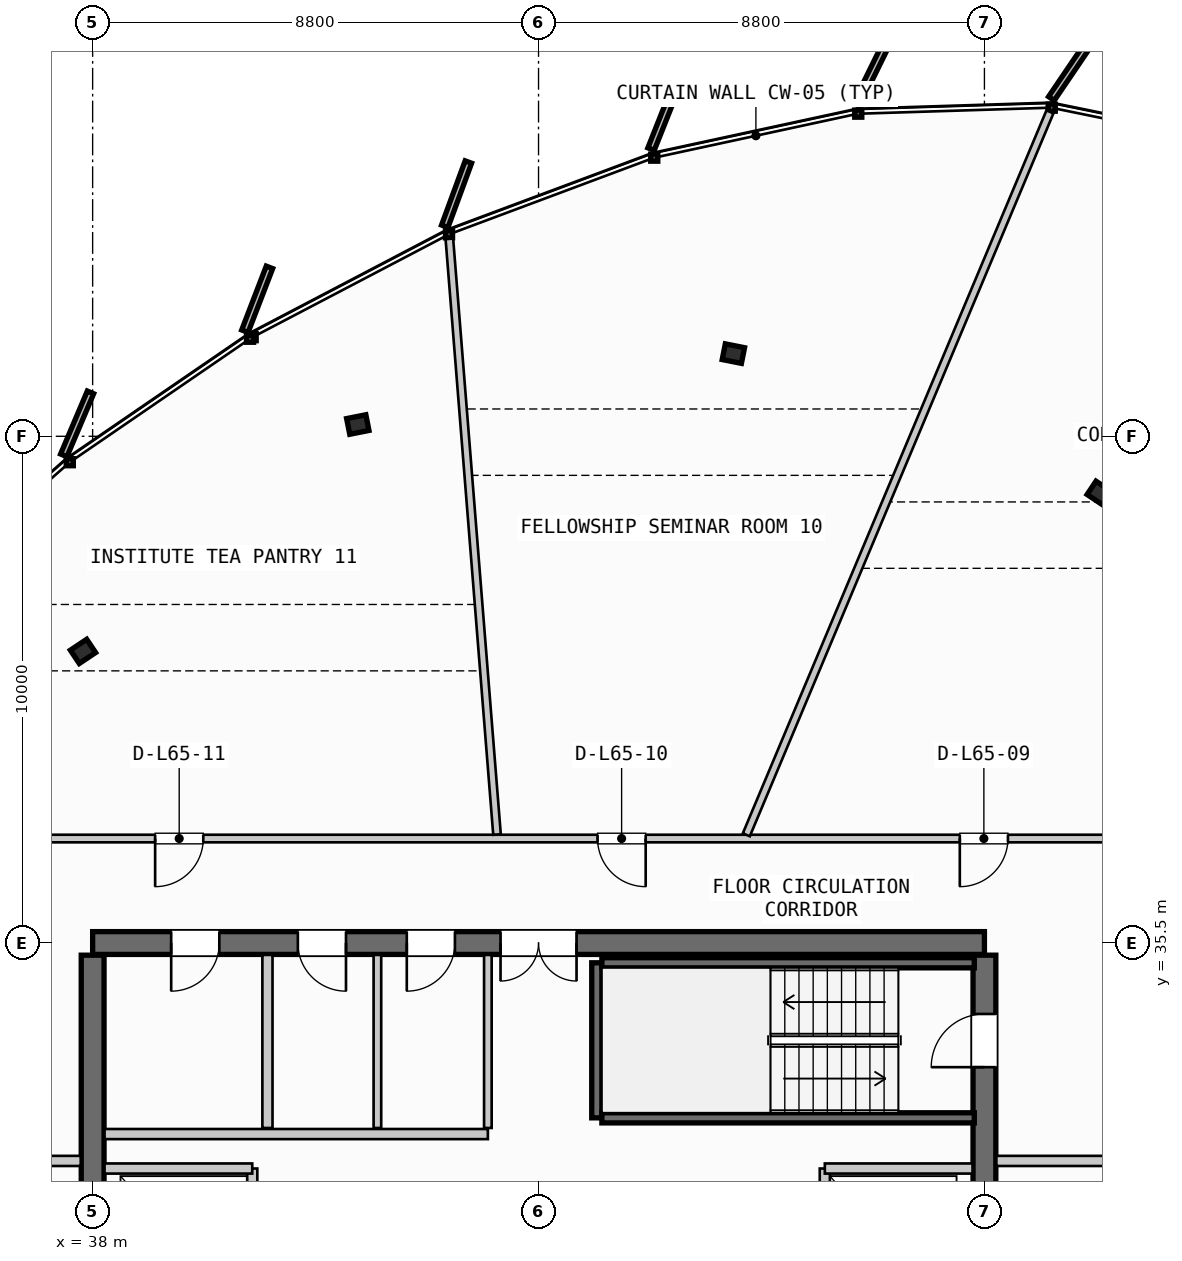
"""IFC4 building model, lengths in metres.
Left out: names, types, materials, properties, quantities, classifications, styles, units other than length and angle.
Written with IfcOpenShell. Run it as: python <this file> out.ifc"""

import sys

from ifc_helpers import new_model, si_unit, direction, frame, frame_2d, origin, origin_2d, place, context, subcontext, project, spatial, rectangle, i_section, extrude, source, transform, mapped, element, fill, save


model = new_model("IFC4")
c1 = context("Model", 3, precision=1e-05, world=origin(), true_north=direction((0.0, 1.0)))
c2 = subcontext(c1, "Body", "Model", "MODEL_VIEW")
j1 = project(units=[si_unit("LENGTHUNIT", "METRE"), si_unit("PLANEANGLEUNIT", "RADIAN")], contexts=[c1])
p1 = place(None, origin())
s1 = spatial("IfcSite", under=j1, at=p1, CompositionType="ELEMENT")
p2 = place(p1, origin())
s2 = spatial("IfcBuilding", under=s1, at=p2, CompositionType="ELEMENT")
p3 = place(p2, frame((0.0, 0.0, 249.1)))
s3 = spatial("IfcBuildingStorey", under=s2, at=p3, CompositionType="ELEMENT", Elevation=249.1)
p4 = place(p3, frame((55.6, 35.5, 0.0), z_axis=(0.0, 0.0, 1.0), x_axis=(-1.0, 0.0, 0.0)))
e1 = element("IfcWall", 1, at=p4, inside=s3, PredefinedType="SHEAR", context=c2, shape_type="SweptSolid", body=[
    extrude(rectangle(XDim=17.6, YDim=0.45, at=frame_2d((8.8, 0.0))), origin(), (0.0, 0.0, 1.0), 3.21),
])
p5 = place(p4, frame((8.05, 0.0, 0.0)))
e2 = element("IfcOpeningElement", 2, at=p5, cuts=e1, PredefinedType="OPENING", context=c2, shape_type="SweptSolid", body=[
    extrude(rectangle(XDim=1.5, YDim=2.2, at=frame_2d((0.75, 1.1))), frame((0.0, 0.235, 0.0), z_axis=(0.0, -1.0, 0.0), x_axis=(1.0, 0.0, 0.0)), (0.0, 0.0, 1.0), 0.47),
])
p6 = place(p4, frame((15.1, 0.0, 0.0)))
e3 = element("IfcOpeningElement", 3, at=p6, cuts=e1, PredefinedType="OPENING", context=c2, shape_type="SweptSolid", body=[
    extrude(rectangle(XDim=0.95, YDim=2.15, at=frame_2d((0.475, 1.075))), frame((0.0, 0.235, 0.0), z_axis=(0.0, -1.0, 0.0), x_axis=(1.0, 0.0, 0.0)), (0.0, 0.0, 1.0), 0.47),
])
p7 = place(p4, frame((12.6, 0.0, 0.0)))
e4 = element("IfcOpeningElement", 4, at=p7, cuts=e1, PredefinedType="OPENING", context=c2, shape_type="SweptSolid", body=[
    extrude(rectangle(XDim=0.95, YDim=2.15, at=frame_2d((0.475, 1.075))), frame((0.0, 0.235, 0.0), z_axis=(0.0, -1.0, 0.0), x_axis=(1.0, 0.0, 0.0)), (0.0, 0.0, 1.0), 0.47),
])
p8 = place(p4, frame((10.45, 0.0, 0.0)))
e5 = element("IfcOpeningElement", 5, at=p8, cuts=e1, PredefinedType="OPENING", context=c2, shape_type="SweptSolid", body=[
    extrude(rectangle(XDim=0.95, YDim=2.15, at=frame_2d((0.475, 1.075))), frame((0.0, 0.235, 0.0), z_axis=(0.0, -1.0, 0.0), x_axis=(1.0, 0.0, 0.0)), (0.0, 0.0, 1.0), 0.47),
])
p9 = place(p3, frame((38.0, 35.26, 0.0), z_axis=(0.0, 0.0, 1.0), x_axis=(0.0, -1.0, 0.0)))
e6 = element("IfcWall", 6, at=p9, inside=s3, PredefinedType="SHEAR", context=c2, shape_type="SweptSolid", body=[
    extrude(rectangle(XDim=14.92, YDim=0.45, at=frame_2d((7.46, 0.0))), origin(), (0.0, 0.0, 1.0), 3.21),
])
p10 = place(p9, frame((5.21, 0.0, 0.0)))
e7 = element("IfcOpeningElement", 7, at=p10, cuts=e6, PredefinedType="OPENING", context=c2, shape_type="SweptSolid", body=[
    extrude(rectangle(XDim=1.1, YDim=2.2, at=frame_2d((0.55, 1.1))), frame((0.0, 0.235, 0.0), z_axis=(0.0, -1.0, 0.0), x_axis=(1.0, 0.0, 0.0)), (0.0, 0.0, 1.0), 0.47),
])
p11 = place(p3, frame((55.6, 20.34, 0.0), z_axis=(0.0, 0.0, 1.0), x_axis=(0.0, 1.0, 0.0)))
e8 = element("IfcWall", 8, at=p11, inside=s3, PredefinedType="SHEAR", context=c2, shape_type="SweptSolid", body=[
    extrude(rectangle(XDim=14.92, YDim=0.45, at=frame_2d((7.46, 0.0))), origin(), (0.0, 0.0, 1.0), 3.21),
])
p12 = place(p11, frame((12.71, 0.0, 0.0)))
e9 = element("IfcOpeningElement", 9, at=p12, cuts=e8, PredefinedType="OPENING", context=c2, shape_type="SweptSolid", body=[
    extrude(rectangle(XDim=1.05, YDim=2.15, at=frame_2d((0.525, 1.075))), frame((0.0, 0.235, 0.0), z_axis=(0.0, -1.0, 0.0), x_axis=(1.0, 0.0, 0.0)), (0.0, 0.0, 1.0), 0.47),
])
p13 = place(p11, frame((8.61, 0.0, 0.0)))
e10 = element("IfcOpeningElement", 10, at=p13, cuts=e8, PredefinedType="OPENING", context=c2, shape_type="SweptSolid", body=[
    extrude(rectangle(XDim=1.1, YDim=2.2, at=frame_2d((0.55, 1.1))), frame((0.0, 0.235, 0.0), z_axis=(0.0, -1.0, 0.0), x_axis=(1.0, 0.0, 0.0)), (0.0, 0.0, 1.0), 0.47),
])
m1 = source(origin(), c2, "Body", "SweptSolid", [
    extrude(i_section(OverallWidth=0.387, OverallDepth=0.316, WebThickness=0.019, FlangeThickness=0.028, FilletRadius=0.015, at=origin_2d()), origin(), (0.0, 0.0, 1.0), 3.21),
])
for number, where, z_axis, x_axis in (
    (11, (57.875, 44.375, 0.0), (0.0, 0.0, 1.0), (0.556, 0.831, 0.0)),
    (12, (50.645, 47.132, 0.0), (0.0, 0.0, 1.0), (0.195, 0.981, 0.0)),
    (13, (43.233, 45.732, 0.0), (0.0, 0.0, 1.0), (-0.195, 0.981, 0.0)),
    (14, (37.81, 41.255, 0.0), (0.0, 0.0, 1.0), (-0.556, 0.831, 0.0)),
):
    element("IfcColumn", number, at=place(p3, frame(where, z_axis=z_axis, x_axis=x_axis)), inside=s3, PredefinedType="COLUMN", context=c2, shape_type="MappedRepresentation", body=[
        mapped(m1, transform((0.0, 0.0, 0.0), scale=1.0)),
    ])
p14 = place(p3, frame((47.95, 32.05, 0.0), z_axis=(0.0, 0.0, 1.0), x_axis=(0.0, 1.0, 0.0)))
e15 = element("IfcWall", 15, at=p14, inside=s3, PredefinedType="SHEAR", context=c2, shape_type="SweptSolid", body=[
    extrude(rectangle(XDim=3.06, YDim=0.2, at=frame_2d((1.53, 0.0))), origin(), (0.0, 0.0, 1.0), 3.21),
])
for number, where, z_axis, x_axis in (
    (16, (48.05, 35.11, 0.0), (0.0, 0.0, 1.0), (1.0, 0.0, 0.0)),
    (17, (55.4, 32.05, 0.0), (0.0, 0.0, 1.0), (-1.0, 0.0, 0.0)),
):
    element("IfcWall", number, at=place(p3, frame(where, z_axis=z_axis, x_axis=x_axis)), inside=s3, PredefinedType="SHEAR", context=c2, shape_type="SweptSolid", body=[
        extrude(rectangle(XDim=7.35, YDim=0.2, at=frame_2d((3.675, 0.0))), origin(), (0.0, 0.0, 1.0), 3.21),
    ])
p15 = place(p3, frame((41.15, 27.95, 0.0), z_axis=(0.0, 0.0, 1.0), x_axis=(0.0, 1.0, 0.0)))
e18 = element("IfcWall", 18, at=p15, inside=s3, PredefinedType="PARTITIONING", context=c2, shape_type="SweptSolid", body=[
    extrude(rectangle(XDim=3.1, YDim=0.2, at=frame_2d((1.55, 0.0))), origin(), (0.0, 0.0, 1.0), 2.28),
])
p16 = place(p3, frame((38.235, 31.05, 0.0), z_axis=(0.0, 0.0, 1.0), x_axis=(1.0, 0.0, 0.0)))
e19 = element("IfcWall", 19, at=p16, inside=s3, PredefinedType="PARTITIONING", context=c2, shape_type="SweptSolid", body=[
    extrude(rectangle(XDim=2.915, YDim=0.2, at=frame_2d((1.458, 0.0))), origin(), (0.0, 0.0, 1.0), 2.28),
])
p17 = place(p3, frame((34.5, 31.2, 0.0), z_axis=(0.0, 0.0, 1.0), x_axis=(1.0, 0.0, 0.0)))
e20 = element("IfcWall", 20, at=p17, inside=s3, PredefinedType="PARTITIONING", context=c2, shape_type="SweptSolid", body=[
    extrude(rectangle(XDim=3.265, YDim=0.2, at=frame_2d((1.632, 0.0))), origin(), (0.0, 0.0, 1.0), 2.28),
])
p18 = place(p3, frame((52.45, 27.95, 0.0), z_axis=(0.0, 0.0, 1.0), x_axis=(0.0, 1.0, 0.0)))
e21 = element("IfcWall", 21, at=p18, inside=s3, PredefinedType="PARTITIONING", context=c2, shape_type="SweptSolid", body=[
    extrude(rectangle(XDim=3.1, YDim=0.2, at=frame_2d((1.55, 0.0))), origin(), (0.0, 0.0, 1.0), 2.28),
])
p19 = place(p3, frame((52.45, 31.05, 0.0), z_axis=(0.0, 0.0, 1.0), x_axis=(1.0, 0.0, 0.0)))
e22 = element("IfcWall", 22, at=p19, inside=s3, PredefinedType="PARTITIONING", context=c2, shape_type="SweptSolid", body=[
    extrude(rectangle(XDim=2.915, YDim=0.2, at=frame_2d((1.458, 0.0))), origin(), (0.0, 0.0, 1.0), 2.28),
])
p20 = place(p3, frame((55.835, 31.2, 0.0), z_axis=(0.0, 0.0, 1.0), x_axis=(1.0, 0.0, 0.0)))
e23 = element("IfcWall", 23, at=p20, inside=s3, PredefinedType="PARTITIONING", context=c2, shape_type="SweptSolid", body=[
    extrude(rectangle(XDim=3.265, YDim=0.2, at=frame_2d((1.633, 0.0))), origin(), (0.0, 0.0, 1.0), 2.28),
])
p21 = place(p3, frame((41.45, 31.85, 0.0), z_axis=(0.0, 0.0, 1.0), x_axis=(0.0, 1.0, 0.0)))
e24 = element("IfcWall", 24, at=p21, inside=s3, PredefinedType="PARTITIONING", context=c2, shape_type="SweptSolid", body=[
    extrude(rectangle(XDim=3.415, YDim=0.2, at=frame_2d((1.708, 0.0))), origin(), (0.0, 0.0, 1.0), 2.28),
])
p22 = place(p3, frame((38.235, 31.73, 0.0), z_axis=(0.0, 0.0, 1.0), x_axis=(1.0, 0.0, 0.0)))
e25 = element("IfcWall", 25, at=p22, inside=s3, PredefinedType="PARTITIONING", context=c2, shape_type="SweptSolid", body=[
    extrude(rectangle(XDim=7.565, YDim=0.2, at=frame_2d((3.782, 0.0))), origin(), (0.0, 0.0, 1.0), 2.28),
])
p23 = place(p3, frame((45.8, 31.85, 0.0), z_axis=(0.0, 0.0, 1.0), x_axis=(0.0, 1.0, 0.0)))
e26 = element("IfcWall", 26, at=p23, inside=s3, PredefinedType="PARTITIONING", context=c2, shape_type="SweptSolid", body=[
    extrude(rectangle(XDim=3.415, YDim=0.15, at=frame_2d((1.708, 0.0))), origin(), (0.0, 0.0, 1.0), 2.28),
])
p24 = place(p3, frame((43.62, 31.85, 0.0), z_axis=(0.0, 0.0, 1.0), x_axis=(0.0, 1.0, 0.0)))
e27 = element("IfcWall", 27, at=p24, inside=s3, PredefinedType="PLUMBINGWALL", context=c2, shape_type="SweptSolid", body=[
    extrude(rectangle(XDim=3.415, YDim=0.15, at=frame_2d((1.708, 0.0))), origin(), (0.0, 0.0, 1.0), 2.28),
])
p25 = place(p3, frame((60.888, 37.562, 0.0), z_axis=(0.0, 0.0, 1.0), x_axis=(-1.0, 0.0, 0.0)))
e28 = element("IfcWall", 28, at=p25, inside=s3, PredefinedType="PARTITIONING", context=c2, shape_type="SweptSolid", body=[
    extrude(rectangle(XDim=28.038, YDim=0.15, at=frame_2d((14.019, 0.0))), origin(), (0.0, 0.0, 1.0), 2.28),
])
p26 = place(p25, frame((4.824, 0.0, 0.0)))
e29 = element("IfcOpeningElement", 29, at=p26, cuts=e28, PredefinedType="OPENING", context=c2, shape_type="SweptSolid", body=[
    extrude(rectangle(XDim=0.95, YDim=2.15, at=frame_2d((0.475, 1.075))), frame((0.0, 0.085, 0.0), z_axis=(0.0, -1.0, 0.0), x_axis=(1.0, 0.0, 0.0)), (0.0, 0.0, 1.0), 0.17),
])
p27 = place(p25, frame((11.973, 0.0, 0.0)))
e30 = element("IfcOpeningElement", 30, at=p27, cuts=e28, PredefinedType="OPENING", context=c2, shape_type="SweptSolid", body=[
    extrude(rectangle(XDim=0.95, YDim=2.15, at=frame_2d((0.475, 1.075))), frame((0.0, 0.085, 0.0), z_axis=(0.0, -1.0, 0.0), x_axis=(1.0, 0.0, 0.0)), (0.0, 0.0, 1.0), 0.17),
])
p28 = place(p25, frame((20.705, 0.0, 0.0)))
e31 = element("IfcOpeningElement", 31, at=p28, cuts=e28, PredefinedType="OPENING", context=c2, shape_type="SweptSolid", body=[
    extrude(rectangle(XDim=0.95, YDim=2.15, at=frame_2d((0.475, 1.075))), frame((0.0, 0.085, 0.0), z_axis=(0.0, -1.0, 0.0), x_axis=(1.0, 0.0, 0.0)), (0.0, 0.0, 1.0), 0.17),
])
p29 = place(p3, frame((50.901, 37.636, 0.0), z_axis=(0.0, 0.0, 1.0), x_axis=(0.387249919783, 0.921974782534, 0.0)))
e32 = element("IfcWall", 32, at=p29, inside=s3, PredefinedType="PARTITIONING", context=c2, shape_type="SweptSolid", body=[
    extrude(rectangle(XDim=15.474, YDim=0.15, at=frame_2d((7.737, 0.0))), origin(), (0.0, 0.0, 1.0), 2.28),
])
p30 = place(p3, frame((45.981, 37.642, 0.0), z_axis=(0.0, 0.0, 1.0), x_axis=(-0.079751805429, 0.996814751863, 0.0)))
e33 = element("IfcWall", 33, at=p30, inside=s3, PredefinedType="PARTITIONING", context=c2, shape_type="SweptSolid", body=[
    extrude(rectangle(XDim=11.792, YDim=0.15, at=frame_2d((5.896, 0.0))), origin(), (0.0, 0.0, 1.0), 2.28),
])
m2 = source(origin(), c2, "Body", "SweptSolid", [
    extrude(rectangle(XDim=1.05, YDim=2.15, at=frame_2d((0.525, 1.075))), frame((0.0, 0.025, 0.0), z_axis=(0.0, -1.0, 0.0), x_axis=(1.0, 0.0, 0.0)), (0.0, 0.0, 1.0), 0.05),
])
p31 = place(p12, origin())
e34 = element("IfcDoor", 34, at=p31, inside=s3, OperationType="SINGLE_SWING_LEFT", PredefinedType="DOOR", context=c2, shape_type="MappedRepresentation", body=[
    mapped(m2, transform((0.0, 0.0, 0.0), scale=1.0)),
])
fill(e9, e34)
m3 = source(origin(), c2, "Body", "SweptSolid", [
    extrude(rectangle(XDim=1.5, YDim=2.2, at=frame_2d((0.75, 1.1))), frame((0.0, 0.025, 0.0), z_axis=(0.0, -1.0, 0.0), x_axis=(1.0, 0.0, 0.0)), (0.0, 0.0, 1.0), 0.05),
])
p32 = place(p5, origin())
e35 = element("IfcDoor", 35, at=p32, inside=s3, OperationType="DOUBLE_DOOR_SINGLE_SWING", PredefinedType="DOOR", context=c2, shape_type="MappedRepresentation", body=[
    mapped(m3, transform((0.0, 0.0, 0.0), scale=1.0)),
])
fill(e2, e35)
m4 = source(origin(), c2, "Body", "SweptSolid", [
    extrude(rectangle(XDim=0.95, YDim=2.15, at=frame_2d((0.475, 1.075))), frame((0.0, 0.025, 0.0), z_axis=(0.0, -1.0, 0.0), x_axis=(1.0, 0.0, 0.0)), (0.0, 0.0, 1.0), 0.05),
])
p33 = place(p6, origin())
e36 = element("IfcDoor", 36, at=p33, inside=s3, OperationType="SINGLE_SWING_RIGHT", PredefinedType="DOOR", context=c2, shape_type="MappedRepresentation", body=[
    mapped(m4, transform((0.0, 0.0, 0.0), scale=1.0)),
])
fill(e3, e36)
p34 = place(p7, origin())
e37 = element("IfcDoor", 37, at=p34, inside=s3, OperationType="SINGLE_SWING_LEFT", PredefinedType="DOOR", context=c2, shape_type="MappedRepresentation", body=[
    mapped(m4, transform((0.0, 0.0, 0.0), scale=1.0)),
])
fill(e4, e37)
p35 = place(p8, origin())
e38 = element("IfcDoor", 38, at=p35, inside=s3, OperationType="SINGLE_SWING_RIGHT", PredefinedType="DOOR", context=c2, shape_type="MappedRepresentation", body=[
    mapped(m4, transform((0.0, 0.0, 0.0), scale=1.0)),
])
fill(e5, e38)
p36 = place(p26, origin())
e39 = element("IfcDoor", 39, at=p36, inside=s3, OperationType="SINGLE_SWING_RIGHT", PredefinedType="DOOR", context=c2, shape_type="MappedRepresentation", body=[
    mapped(m4, transform((0.0, 0.0, 0.0), scale=1.0)),
])
fill(e29, e39)
p37 = place(p27, origin())
e40 = element("IfcDoor", 40, at=p37, inside=s3, OperationType="SINGLE_SWING_LEFT", PredefinedType="DOOR", context=c2, shape_type="MappedRepresentation", body=[
    mapped(m4, transform((0.0, 0.0, 0.0), scale=1.0)),
])
fill(e30, e40)
p38 = place(p28, origin())
e41 = element("IfcDoor", 41, at=p38, inside=s3, OperationType="SINGLE_SWING_RIGHT", PredefinedType="DOOR", context=c2, shape_type="MappedRepresentation", body=[
    mapped(m4, transform((0.0, 0.0, 0.0), scale=1.0)),
])
fill(e31, e41)
save(model, sys.argv[1])
